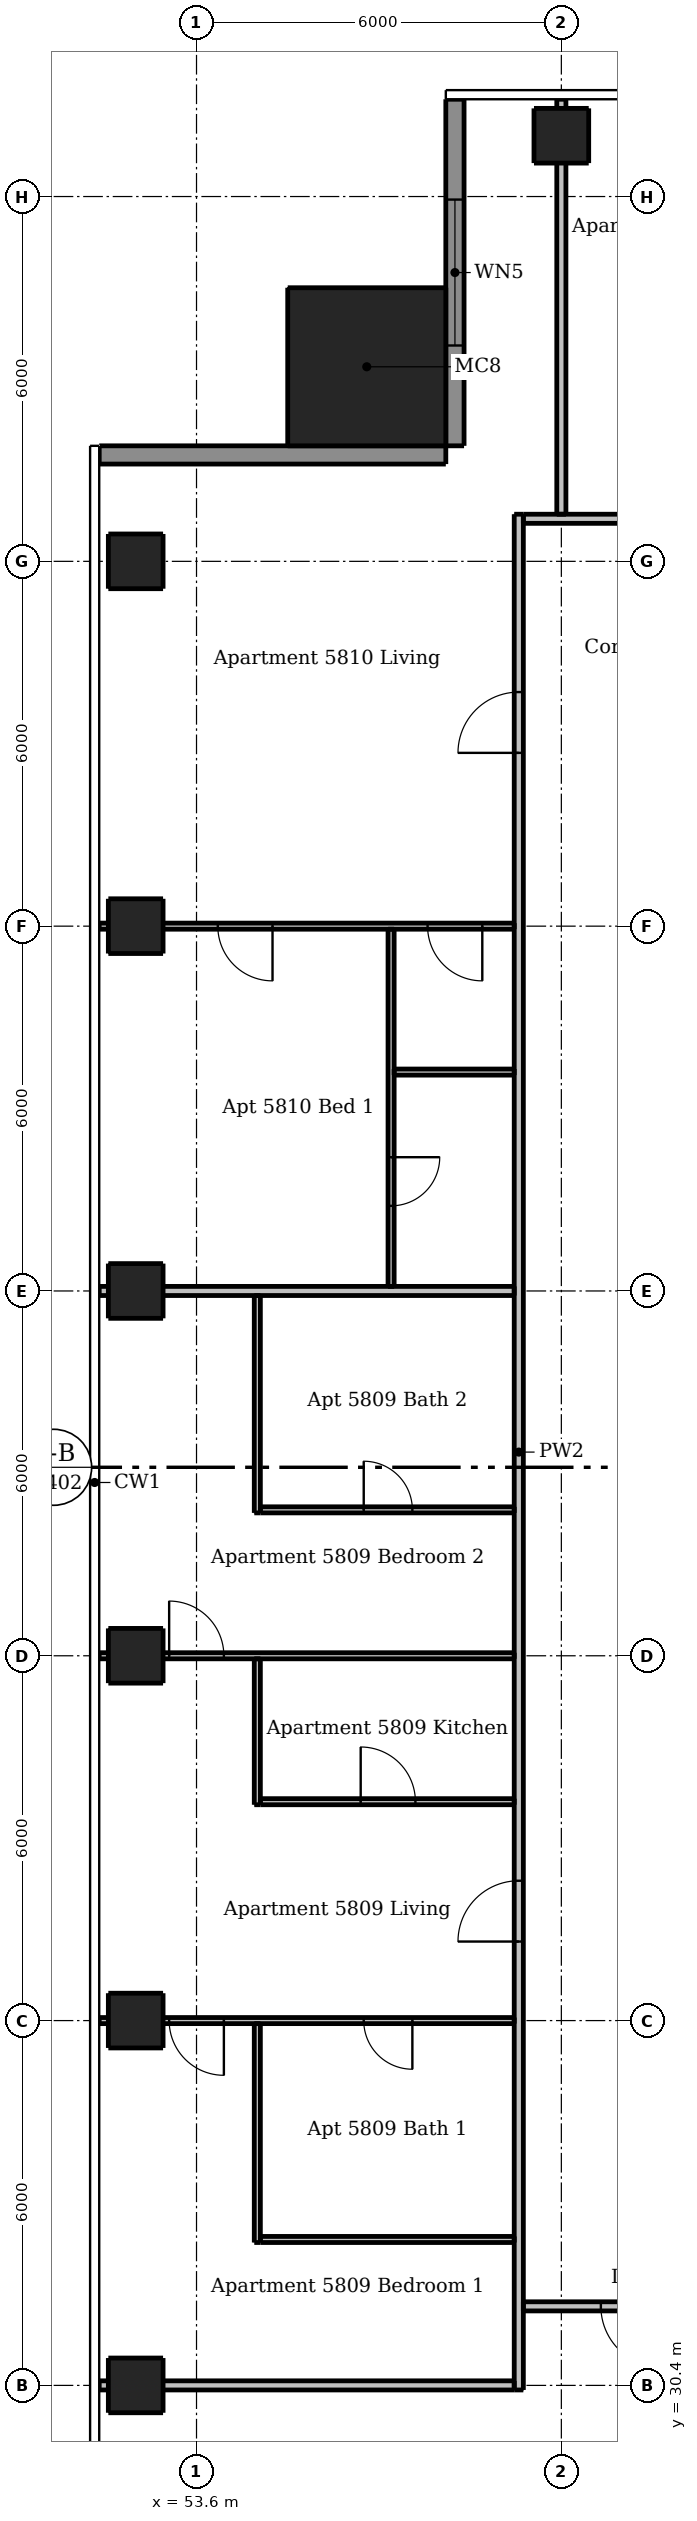
"""IFC4 building model, lengths in metres.
Left out: names, types, materials, properties, quantities, classifications, styles, units other than length and angle.
Written with IfcOpenShell. Run it as: python <this file> out.ifc"""

import sys

from ifc_helpers import new_model, si_unit, direction, frame, frame_2d, origin, origin_2d, place, context, subcontext, project, spatial, rectangle, extrude, element, fill, save


model = new_model("IFC4")
c1 = context("Model", 3, precision=1e-05, world=origin(), true_north=direction((0.0, 1.0)))
c2 = subcontext(c1, "Body", "Model", "MODEL_VIEW")
j1 = project(units=[si_unit("LENGTHUNIT", "METRE"), si_unit("PLANEANGLEUNIT", "RADIAN")], contexts=[c1])
p1 = place(None, origin())
s1 = spatial("IfcSite", under=j1, at=p1, CompositionType="ELEMENT")
p2 = place(p1, origin())
s2 = spatial("IfcBuilding", under=s1, at=p2, CompositionType="ELEMENT")
p3 = place(p2, frame((0.0, 0.0, 216.7)))
s3 = spatial("IfcBuildingStorey", under=s2, at=p3, CompositionType="ELEMENT", Elevation=216.7)
for number, where, z_axis, x_axis in (
    (1, (59.6, 67.4, 0.0), (0.0, 0.0, 1.0), (1.0, 0.0, 0.0)),
    (2, (52.6, 30.4, 0.0), (0.0, 0.0, 1.0), (1.0, 0.0, 0.0)),
    (3, (52.6, 36.4, 0.0), (0.0, 0.0, 1.0), (1.0, 0.0, 0.0)),
    (4, (52.6, 42.4, 0.0), (0.0, 0.0, 1.0), (1.0, 0.0, 0.0)),
    (5, (52.6, 48.4, 0.0), (0.0, 0.0, 1.0), (1.0, 0.0, 0.0)),
    (6, (52.6, 54.4, 0.0), (0.0, 0.0, 1.0), (1.0, 0.0, 0.0)),
    (7, (52.6, 60.4, 0.0), (0.0, 0.0, 1.0), (1.0, 0.0, 0.0)),
):
    element("IfcColumn", number, at=place(p3, frame(where, z_axis=z_axis, x_axis=x_axis)), inside=s3, PredefinedType="COLUMN", context=c2, shape_type="SweptSolid", body=[
        extrude(rectangle(XDim=0.9, YDim=0.9, at=origin_2d()), origin(), (0.0, 0.0, 1.0), 3.05),
    ])
p4 = place(p3, frame((56.4, 63.6, 0.0), z_axis=(0.0, 0.0, 1.0), x_axis=(1.0, 0.0, 0.0)))
e8 = element("IfcColumn", 8, at=p4, inside=s3, PredefinedType="COLUMN", context=c2, shape_type="SweptSolid", body=[
    extrude(rectangle(XDim=2.6, YDim=2.6, at=origin_2d()), origin(), (0.0, 0.0, 1.0), 3.3),
])
p5 = place(p3, frame((57.85, 68.0, 0.0), z_axis=(0.0, 0.0, 1.0), x_axis=(0.0, -1.0, 0.0)))
e9 = element("IfcWall", 9, at=p5, inside=s3, PredefinedType="SOLIDWALL", context=c2, shape_type="SweptSolid", body=[
    extrude(rectangle(XDim=5.7, YDim=0.3, at=frame_2d((2.85, 0.0))), origin(), (0.0, 0.0, 1.0), 3.05),
])
p6 = place(p5, frame((1.65, 0.0, 0.15)))
e10 = element("IfcOpeningElement", 10, at=p6, cuts=e9, PredefinedType="OPENING", context=c2, shape_type="SweptSolid", body=[
    extrude(rectangle(XDim=2.4, YDim=2.1, at=frame_2d((1.2, 1.05))), frame((0.0, 0.16, 0.0), z_axis=(0.0, -1.0, 0.0), x_axis=(1.0, 0.0, 0.0)), (0.0, 0.0, 1.0), 0.32),
])
p7 = place(p3, frame((57.7, 62.15, 0.0), z_axis=(0.0, 0.0, 1.0), x_axis=(-1.0, 0.0, 0.0)))
e11 = element("IfcWall", 11, at=p7, inside=s3, PredefinedType="SOLIDWALL", context=c2, shape_type="SweptSolid", body=[
    extrude(rectangle(XDim=5.7, YDim=0.3, at=frame_2d((2.85, 0.0))), origin(), (0.0, 0.0, 1.0), 3.05),
])
p8 = place(p3, frame((54.6, 32.75, 0.0), z_axis=(0.0, 0.0, 1.0), x_axis=(0.0, 1.0, 0.0)))
e12 = element("IfcWall", 12, at=p8, inside=s3, PredefinedType="PARTITIONING", context=c2, shape_type="SweptSolid", body=[
    extrude(rectangle(XDim=3.6, YDim=0.1, at=frame_2d((1.8, 0.0))), origin(), (0.0, 0.0, 1.0), 3.05),
])
p9 = place(p3, frame((54.6, 39.95, 0.0), z_axis=(0.0, 0.0, 1.0), x_axis=(0.0, 1.0, 0.0)))
e13 = element("IfcWall", 13, at=p9, inside=s3, PredefinedType="PARTITIONING", context=c2, shape_type="SweptSolid", body=[
    extrude(rectangle(XDim=2.4, YDim=0.1, at=frame_2d((1.2, 0.0))), origin(), (0.0, 0.0, 1.0), 3.05),
])
p10 = place(p3, frame((54.6, 44.75, 0.0), z_axis=(0.0, 0.0, 1.0), x_axis=(0.0, 1.0, 0.0)))
e14 = element("IfcWall", 14, at=p10, inside=s3, PredefinedType="PARTITIONING", context=c2, shape_type="SweptSolid", body=[
    extrude(rectangle(XDim=3.575, YDim=0.1, at=frame_2d((1.788, 0.0))), origin(), (0.0, 0.0, 1.0), 3.05),
])
p11 = place(p3, frame((56.8, 54.35, 0.0), z_axis=(0.0, 0.0, 1.0), x_axis=(0.0, -1.0, 0.0)))
e15 = element("IfcWall", 15, at=p11, inside=s3, PredefinedType="PARTITIONING", context=c2, shape_type="SweptSolid", body=[
    extrude(rectangle(XDim=5.875, YDim=0.1, at=frame_2d((2.938, 0.0))), origin(), (0.0, 0.0, 1.0), 3.05),
])
p12 = place(p11, frame((3.75, 0.0, 0.0)))
e16 = element("IfcOpeningElement", 16, at=p12, cuts=e15, PredefinedType="OPENING", context=c2, shape_type="SweptSolid", body=[
    extrude(rectangle(XDim=0.8, YDim=2.1, at=frame_2d((0.4, 1.05))), frame((0.0, 0.06, 0.0), z_axis=(0.0, -1.0, 0.0), x_axis=(1.0, 0.0, 0.0)), (0.0, 0.0, 1.0), 0.12),
])
p13 = place(p3, frame((58.825, 54.4, 0.0), z_axis=(0.0, 0.0, 1.0), x_axis=(-1.0, 0.0, 0.0)))
e17 = element("IfcWall", 17, at=p13, inside=s3, PredefinedType="PARTITIONING", context=c2, shape_type="SweptSolid", body=[
    extrude(rectangle(XDim=6.825, YDim=0.1, at=frame_2d((3.413, 0.0))), origin(), (0.0, 0.0, 1.0), 2.516),
])
p14 = place(p13, frame((0.525, 0.0, 0.0)))
e18 = element("IfcOpeningElement", 18, at=p14, cuts=e17, PredefinedType="OPENING", context=c2, shape_type="SweptSolid", body=[
    extrude(rectangle(XDim=0.9, YDim=2.1, at=frame_2d((0.45, 1.05))), frame((0.0, 0.06, 0.0), z_axis=(0.0, -1.0, 0.0), x_axis=(1.0, 0.0, 0.0)), (0.0, 0.0, 1.0), 0.12),
])
p15 = place(p13, frame((3.975, 0.0, 0.0)))
e19 = element("IfcOpeningElement", 19, at=p15, cuts=e17, PredefinedType="OPENING", context=c2, shape_type="SweptSolid", body=[
    extrude(rectangle(XDim=0.9, YDim=2.1, at=frame_2d((0.45, 1.05))), frame((0.0, 0.06, 0.0), z_axis=(0.0, -1.0, 0.0), x_axis=(1.0, 0.0, 0.0)), (0.0, 0.0, 1.0), 0.12),
])
p16 = place(p3, frame((56.85, 52.0, 0.0), z_axis=(0.0, 0.0, 1.0), x_axis=(1.0, 0.0, 0.0)))
e20 = element("IfcWall", 20, at=p16, inside=s3, PredefinedType="PARTITIONING", context=c2, shape_type="SweptSolid", body=[
    extrude(rectangle(XDim=1.975, YDim=0.1, at=frame_2d((0.987, 0.0))), origin(), (0.0, 0.0, 1.0), 3.05),
])
p17 = place(p3, frame((54.65, 44.8, 0.0), z_axis=(0.0, 0.0, 1.0), x_axis=(1.0, 0.0, 0.0)))
e21 = element("IfcWall", 21, at=p17, inside=s3, PredefinedType="PARTITIONING", context=c2, shape_type="SweptSolid", body=[
    extrude(rectangle(XDim=4.175, YDim=0.1, at=frame_2d((2.087, 0.0))), origin(), (0.0, 0.0, 1.0), 3.05),
])
p18 = place(p17, frame((1.7, 0.0, 0.0)))
e22 = element("IfcOpeningElement", 22, at=p18, cuts=e21, PredefinedType="OPENING", context=c2, shape_type="SweptSolid", body=[
    extrude(rectangle(XDim=0.8, YDim=2.1, at=frame_2d((0.4, 1.05))), frame((0.0, 0.06, 0.0), z_axis=(0.0, -1.0, 0.0), x_axis=(1.0, 0.0, 0.0)), (0.0, 0.0, 1.0), 0.12),
])
p19 = place(p3, frame((52.0, 42.4, 0.0), z_axis=(0.0, 0.0, 1.0), x_axis=(1.0, 0.0, 0.0)))
e23 = element("IfcWall", 23, at=p19, inside=s3, PredefinedType="PARTITIONING", context=c2, shape_type="SweptSolid", body=[
    extrude(rectangle(XDim=6.825, YDim=0.1, at=frame_2d((3.413, 0.0))), origin(), (0.0, 0.0, 1.0), 2.516),
])
p20 = place(p19, frame((1.15, 0.0, 0.0)))
e24 = element("IfcOpeningElement", 24, at=p20, cuts=e23, PredefinedType="OPENING", context=c2, shape_type="SweptSolid", body=[
    extrude(rectangle(XDim=0.9, YDim=2.1, at=frame_2d((0.45, 1.05))), frame((0.0, 0.06, 0.0), z_axis=(0.0, -1.0, 0.0), x_axis=(1.0, 0.0, 0.0)), (0.0, 0.0, 1.0), 0.12),
])
p21 = place(p3, frame((54.65, 40.0, 0.0), z_axis=(0.0, 0.0, 1.0), x_axis=(1.0, 0.0, 0.0)))
e25 = element("IfcWall", 25, at=p21, inside=s3, PredefinedType="PARTITIONING", context=c2, shape_type="SweptSolid", body=[
    extrude(rectangle(XDim=4.175, YDim=0.1, at=frame_2d((2.087, 0.0))), origin(), (0.0, 0.0, 1.0), 3.05),
])
p22 = place(p21, frame((1.65, 0.0, 0.0)))
e26 = element("IfcOpeningElement", 26, at=p22, cuts=e25, PredefinedType="OPENING", context=c2, shape_type="SweptSolid", body=[
    extrude(rectangle(XDim=0.9, YDim=2.1, at=frame_2d((0.45, 1.05))), frame((0.0, 0.06, 0.0), z_axis=(0.0, -1.0, 0.0), x_axis=(1.0, 0.0, 0.0)), (0.0, 0.0, 1.0), 0.12),
])
p23 = place(p3, frame((58.825, 36.4, 0.0), z_axis=(0.0, 0.0, 1.0), x_axis=(-1.0, 0.0, 0.0)))
e27 = element("IfcWall", 27, at=p23, inside=s3, PredefinedType="PARTITIONING", context=c2, shape_type="SweptSolid", body=[
    extrude(rectangle(XDim=6.825, YDim=0.1, at=frame_2d((3.413, 0.0))), origin(), (0.0, 0.0, 1.0), 2.516),
])
p24 = place(p23, frame((4.775, 0.0, 0.0)))
e28 = element("IfcOpeningElement", 28, at=p24, cuts=e27, PredefinedType="OPENING", context=c2, shape_type="SweptSolid", body=[
    extrude(rectangle(XDim=0.9, YDim=2.1, at=frame_2d((0.45, 1.05))), frame((0.0, 0.06, 0.0), z_axis=(0.0, -1.0, 0.0), x_axis=(1.0, 0.0, 0.0)), (0.0, 0.0, 1.0), 0.12),
])
p25 = place(p23, frame((1.675, 0.0, 0.0)))
e29 = element("IfcOpeningElement", 29, at=p25, cuts=e27, PredefinedType="OPENING", context=c2, shape_type="SweptSolid", body=[
    extrude(rectangle(XDim=0.8, YDim=2.1, at=frame_2d((0.4, 1.05))), frame((0.0, 0.06, 0.0), z_axis=(0.0, -1.0, 0.0), x_axis=(1.0, 0.0, 0.0)), (0.0, 0.0, 1.0), 0.12),
])
p26 = place(p3, frame((54.65, 32.8, 0.0), z_axis=(0.0, 0.0, 1.0), x_axis=(1.0, 0.0, 0.0)))
e30 = element("IfcWall", 30, at=p26, inside=s3, PredefinedType="PARTITIONING", context=c2, shape_type="SweptSolid", body=[
    extrude(rectangle(XDim=4.175, YDim=0.1, at=frame_2d((2.087, 0.0))), origin(), (0.0, 0.0, 1.0), 3.05),
])
p27 = place(p3, frame((58.9, 30.325, 0.0), z_axis=(0.0, 0.0, 1.0), x_axis=(0.0, 1.0, 0.0)))
e31 = element("IfcWall", 31, at=p27, inside=s3, PredefinedType="PARTITIONING", context=c2, shape_type="SweptSolid", body=[
    extrude(rectangle(XDim=30.85, YDim=0.15, at=frame_2d((15.425, 0.0))), origin(), (0.0, 0.0, 1.0), 3.05),
])
p28 = place(p27, frame((7.375, 0.0, 0.0)))
e32 = element("IfcOpeningElement", 32, at=p28, cuts=e31, PredefinedType="OPENING", context=c2, shape_type="SweptSolid", body=[
    extrude(rectangle(XDim=1.0, YDim=2.1, at=frame_2d((0.5, 1.05))), frame((0.0, 0.085, 0.0), z_axis=(0.0, -1.0, 0.0), x_axis=(1.0, 0.0, 0.0)), (0.0, 0.0, 1.0), 0.17),
])
p29 = place(p27, frame((26.925, 0.0, 0.0)))
e33 = element("IfcOpeningElement", 33, at=p29, cuts=e31, PredefinedType="OPENING", context=c2, shape_type="SweptSolid", body=[
    extrude(rectangle(XDim=1.0, YDim=2.1, at=frame_2d((0.5, 1.05))), frame((0.0, 0.085, 0.0), z_axis=(0.0, -1.0, 0.0), x_axis=(1.0, 0.0, 0.0)), (0.0, 0.0, 1.0), 0.17),
])
p30 = place(p3, frame((59.6, 61.175, 0.0), z_axis=(0.0, 0.0, 1.0), x_axis=(0.0, 1.0, 0.0)))
e34 = element("IfcWall", 34, at=p30, inside=s3, PredefinedType="PARTITIONING", context=c2, shape_type="SweptSolid", body=[
    extrude(rectangle(XDim=6.825, YDim=0.15, at=frame_2d((3.413, 0.0))), origin(), (0.0, 0.0, 1.0), 2.51),
])
p31 = place(p3, frame((58.975, 61.1, 0.0), z_axis=(0.0, 0.0, 1.0), x_axis=(1.0, 0.0, 0.0)))
e35 = element("IfcWall", 35, at=p31, inside=s3, PredefinedType="PARTITIONING", context=c2, shape_type="SweptSolid", body=[
    extrude(rectangle(XDim=29.25, YDim=0.15, at=frame_2d((14.625, 0.0))), origin(), (0.0, 0.0, 1.0), 3.05),
])
p32 = place(p31, frame((7.925, 0.0, 0.0)))
e36 = element("IfcOpeningElement", 36, at=p32, cuts=e35, PredefinedType="OPENING", context=c2, shape_type="SweptSolid", body=[
    extrude(rectangle(XDim=1.0, YDim=2.1, at=frame_2d((0.5, 1.05))), frame((0.0, 0.085, 0.0), z_axis=(0.0, -1.0, 0.0), x_axis=(1.0, 0.0, 0.0)), (0.0, 0.0, 1.0), 0.17),
])
p33 = place(p31, frame((26.475, 0.0, 0.0)))
e37 = element("IfcOpeningElement", 37, at=p33, cuts=e35, PredefinedType="OPENING", context=c2, shape_type="SweptSolid", body=[
    extrude(rectangle(XDim=1.0, YDim=2.1, at=frame_2d((0.5, 1.05))), frame((0.0, 0.085, 0.0), z_axis=(0.0, -1.0, 0.0), x_axis=(1.0, 0.0, 0.0)), (0.0, 0.0, 1.0), 0.17),
])
p34 = place(p3, frame((52.0, 48.4, 0.0), z_axis=(0.0, 0.0, 1.0), x_axis=(1.0, 0.0, 0.0)))
e38 = element("IfcWall", 38, at=p34, inside=s3, PredefinedType="PARTITIONING", context=c2, shape_type="SweptSolid", body=[
    extrude(rectangle(XDim=6.825, YDim=0.15, at=frame_2d((3.413, 0.0))), origin(), (0.0, 0.0, 1.0), 2.516),
])
p35 = place(p3, frame((89.525, 31.7, 0.0), z_axis=(0.0, 0.0, 1.0), x_axis=(-1.0, 0.0, 0.0)))
e39 = element("IfcWall", 39, at=p35, inside=s3, PredefinedType="PARTITIONING", context=c2, shape_type="SweptSolid", body=[
    extrude(rectangle(XDim=30.55, YDim=0.15, at=frame_2d((15.275, 0.0))), origin(), (0.0, 0.0, 1.0), 3.05),
])
p36 = place(p35, frame((28.275, 0.0, 0.0)))
e40 = element("IfcOpeningElement", 40, at=p36, cuts=e39, PredefinedType="OPENING", context=c2, shape_type="SweptSolid", body=[
    extrude(rectangle(XDim=1.0, YDim=2.1, at=frame_2d((0.5, 1.05))), frame((0.0, 0.085, 0.0), z_axis=(0.0, -1.0, 0.0), x_axis=(1.0, 0.0, 0.0)), (0.0, 0.0, 1.0), 0.17),
])
p37 = place(p35, frame((12.625, 0.0, 0.0)))
e41 = element("IfcOpeningElement", 41, at=p37, cuts=e39, PredefinedType="OPENING", context=c2, shape_type="SweptSolid", body=[
    extrude(rectangle(XDim=1.0, YDim=2.1, at=frame_2d((0.5, 1.05))), frame((0.0, 0.085, 0.0), z_axis=(0.0, -1.0, 0.0), x_axis=(1.0, 0.0, 0.0)), (0.0, 0.0, 1.0), 0.17),
])
p38 = place(p35, frame((2.425, 0.0, 0.0)))
e42 = element("IfcOpeningElement", 42, at=p38, cuts=e39, PredefinedType="OPENING", context=c2, shape_type="SweptSolid", body=[
    extrude(rectangle(XDim=1.0, YDim=2.1, at=frame_2d((0.5, 1.05))), frame((0.0, 0.085, 0.0), z_axis=(0.0, -1.0, 0.0), x_axis=(1.0, 0.0, 0.0)), (0.0, 0.0, 1.0), 0.17),
])
p39 = place(p3, frame((52.0, 30.4, 0.0), z_axis=(0.0, 0.0, 1.0), x_axis=(1.0, 0.0, 0.0)))
e43 = element("IfcWall", 43, at=p39, inside=s3, PredefinedType="PARTITIONING", context=c2, shape_type="SweptSolid", body=[
    extrude(rectangle(XDim=6.825, YDim=0.15, at=frame_2d((3.413, 0.0))), origin(), (0.0, 0.0, 1.0), 2.647),
])
p40 = place(p6, origin())
e44 = element("IfcWindow", 44, at=p40, inside=s3, PartitioningType="DOUBLE_PANEL_VERTICAL", PredefinedType="WINDOW", context=c2, shape_type="SweptSolid", body=[
    extrude(rectangle(XDim=2.4, YDim=2.1, at=frame_2d((1.2, 1.05))), frame((0.0, 0.03, 0.0), z_axis=(0.0, -1.0, 0.0), x_axis=(1.0, 0.0, 0.0)), (0.0, 0.0, 1.0), 0.06),
])
fill(e10, e44)
p41 = place(p36, origin())
e45 = element("IfcDoor", 45, at=p41, inside=s3, OperationType="SINGLE_SWING_LEFT", PredefinedType="DOOR", context=c2, shape_type="SweptSolid", body=[
    extrude(rectangle(XDim=1.0, YDim=2.1, at=frame_2d((0.5, 1.05))), frame((0.0, 0.025, 0.0), z_axis=(0.0, -1.0, 0.0), x_axis=(1.0, 0.0, 0.0)), (0.0, 0.0, 1.0), 0.05),
])
fill(e40, e45)
p42 = place(p28, origin())
e46 = element("IfcDoor", 46, at=p42, inside=s3, OperationType="SINGLE_SWING_LEFT", PredefinedType="DOOR", context=c2, shape_type="SweptSolid", body=[
    extrude(rectangle(XDim=1.0, YDim=2.1, at=frame_2d((0.5, 1.05))), frame((0.0, 0.025, 0.0), z_axis=(0.0, -1.0, 0.0), x_axis=(1.0, 0.0, 0.0)), (0.0, 0.0, 1.0), 0.05),
])
fill(e32, e46)
p43 = place(p22, origin())
e47 = element("IfcDoor", 47, at=p43, inside=s3, OperationType="SINGLE_SWING_LEFT", PredefinedType="DOOR", context=c2, shape_type="SweptSolid", body=[
    extrude(rectangle(XDim=0.9, YDim=2.1, at=frame_2d((0.45, 1.05))), frame((0.0, 0.025, 0.0), z_axis=(0.0, -1.0, 0.0), x_axis=(1.0, 0.0, 0.0)), (0.0, 0.0, 1.0), 0.05),
])
fill(e26, e47)
p44 = place(p24, origin())
e48 = element("IfcDoor", 48, at=p44, inside=s3, OperationType="SINGLE_SWING_LEFT", PredefinedType="DOOR", context=c2, shape_type="SweptSolid", body=[
    extrude(rectangle(XDim=0.9, YDim=2.1, at=frame_2d((0.45, 1.05))), frame((0.0, 0.025, 0.0), z_axis=(0.0, -1.0, 0.0), x_axis=(1.0, 0.0, 0.0)), (0.0, 0.0, 1.0), 0.05),
])
fill(e28, e48)
p45 = place(p25, origin())
e49 = element("IfcDoor", 49, at=p45, inside=s3, OperationType="SINGLE_SWING_LEFT", PredefinedType="DOOR", context=c2, shape_type="SweptSolid", body=[
    extrude(rectangle(XDim=0.8, YDim=2.1, at=frame_2d((0.4, 1.05))), frame((0.0, 0.025, 0.0), z_axis=(0.0, -1.0, 0.0), x_axis=(1.0, 0.0, 0.0)), (0.0, 0.0, 1.0), 0.05),
])
fill(e29, e49)
p46 = place(p20, origin())
e50 = element("IfcDoor", 50, at=p46, inside=s3, OperationType="SINGLE_SWING_LEFT", PredefinedType="DOOR", context=c2, shape_type="SweptSolid", body=[
    extrude(rectangle(XDim=0.9, YDim=2.1, at=frame_2d((0.45, 1.05))), frame((0.0, 0.025, 0.0), z_axis=(0.0, -1.0, 0.0), x_axis=(1.0, 0.0, 0.0)), (0.0, 0.0, 1.0), 0.05),
])
fill(e24, e50)
p47 = place(p18, origin())
e51 = element("IfcDoor", 51, at=p47, inside=s3, OperationType="SINGLE_SWING_LEFT", PredefinedType="DOOR", context=c2, shape_type="SweptSolid", body=[
    extrude(rectangle(XDim=0.8, YDim=2.1, at=frame_2d((0.4, 1.05))), frame((0.0, 0.025, 0.0), z_axis=(0.0, -1.0, 0.0), x_axis=(1.0, 0.0, 0.0)), (0.0, 0.0, 1.0), 0.05),
])
fill(e22, e51)
p48 = place(p29, origin())
e52 = element("IfcDoor", 52, at=p48, inside=s3, OperationType="SINGLE_SWING_LEFT", PredefinedType="DOOR", context=c2, shape_type="SweptSolid", body=[
    extrude(rectangle(XDim=1.0, YDim=2.1, at=frame_2d((0.5, 1.05))), frame((0.0, 0.025, 0.0), z_axis=(0.0, -1.0, 0.0), x_axis=(1.0, 0.0, 0.0)), (0.0, 0.0, 1.0), 0.05),
])
fill(e33, e52)
p49 = place(p14, origin())
e53 = element("IfcDoor", 53, at=p49, inside=s3, OperationType="SINGLE_SWING_LEFT", PredefinedType="DOOR", context=c2, shape_type="SweptSolid", body=[
    extrude(rectangle(XDim=0.9, YDim=2.1, at=frame_2d((0.45, 1.05))), frame((0.0, 0.025, 0.0), z_axis=(0.0, -1.0, 0.0), x_axis=(1.0, 0.0, 0.0)), (0.0, 0.0, 1.0), 0.05),
])
fill(e18, e53)
p50 = place(p15, origin())
e54 = element("IfcDoor", 54, at=p50, inside=s3, OperationType="SINGLE_SWING_LEFT", PredefinedType="DOOR", context=c2, shape_type="SweptSolid", body=[
    extrude(rectangle(XDim=0.9, YDim=2.1, at=frame_2d((0.45, 1.05))), frame((0.0, 0.025, 0.0), z_axis=(0.0, -1.0, 0.0), x_axis=(1.0, 0.0, 0.0)), (0.0, 0.0, 1.0), 0.05),
])
fill(e19, e54)
p51 = place(p12, origin())
e55 = element("IfcDoor", 55, at=p51, inside=s3, OperationType="SINGLE_SWING_LEFT", PredefinedType="DOOR", context=c2, shape_type="SweptSolid", body=[
    extrude(rectangle(XDim=0.8, YDim=2.1, at=frame_2d((0.4, 1.05))), frame((0.0, 0.025, 0.0), z_axis=(0.0, -1.0, 0.0), x_axis=(1.0, 0.0, 0.0)), (0.0, 0.0, 1.0), 0.05),
])
fill(e16, e55)
save(model, sys.argv[1])
